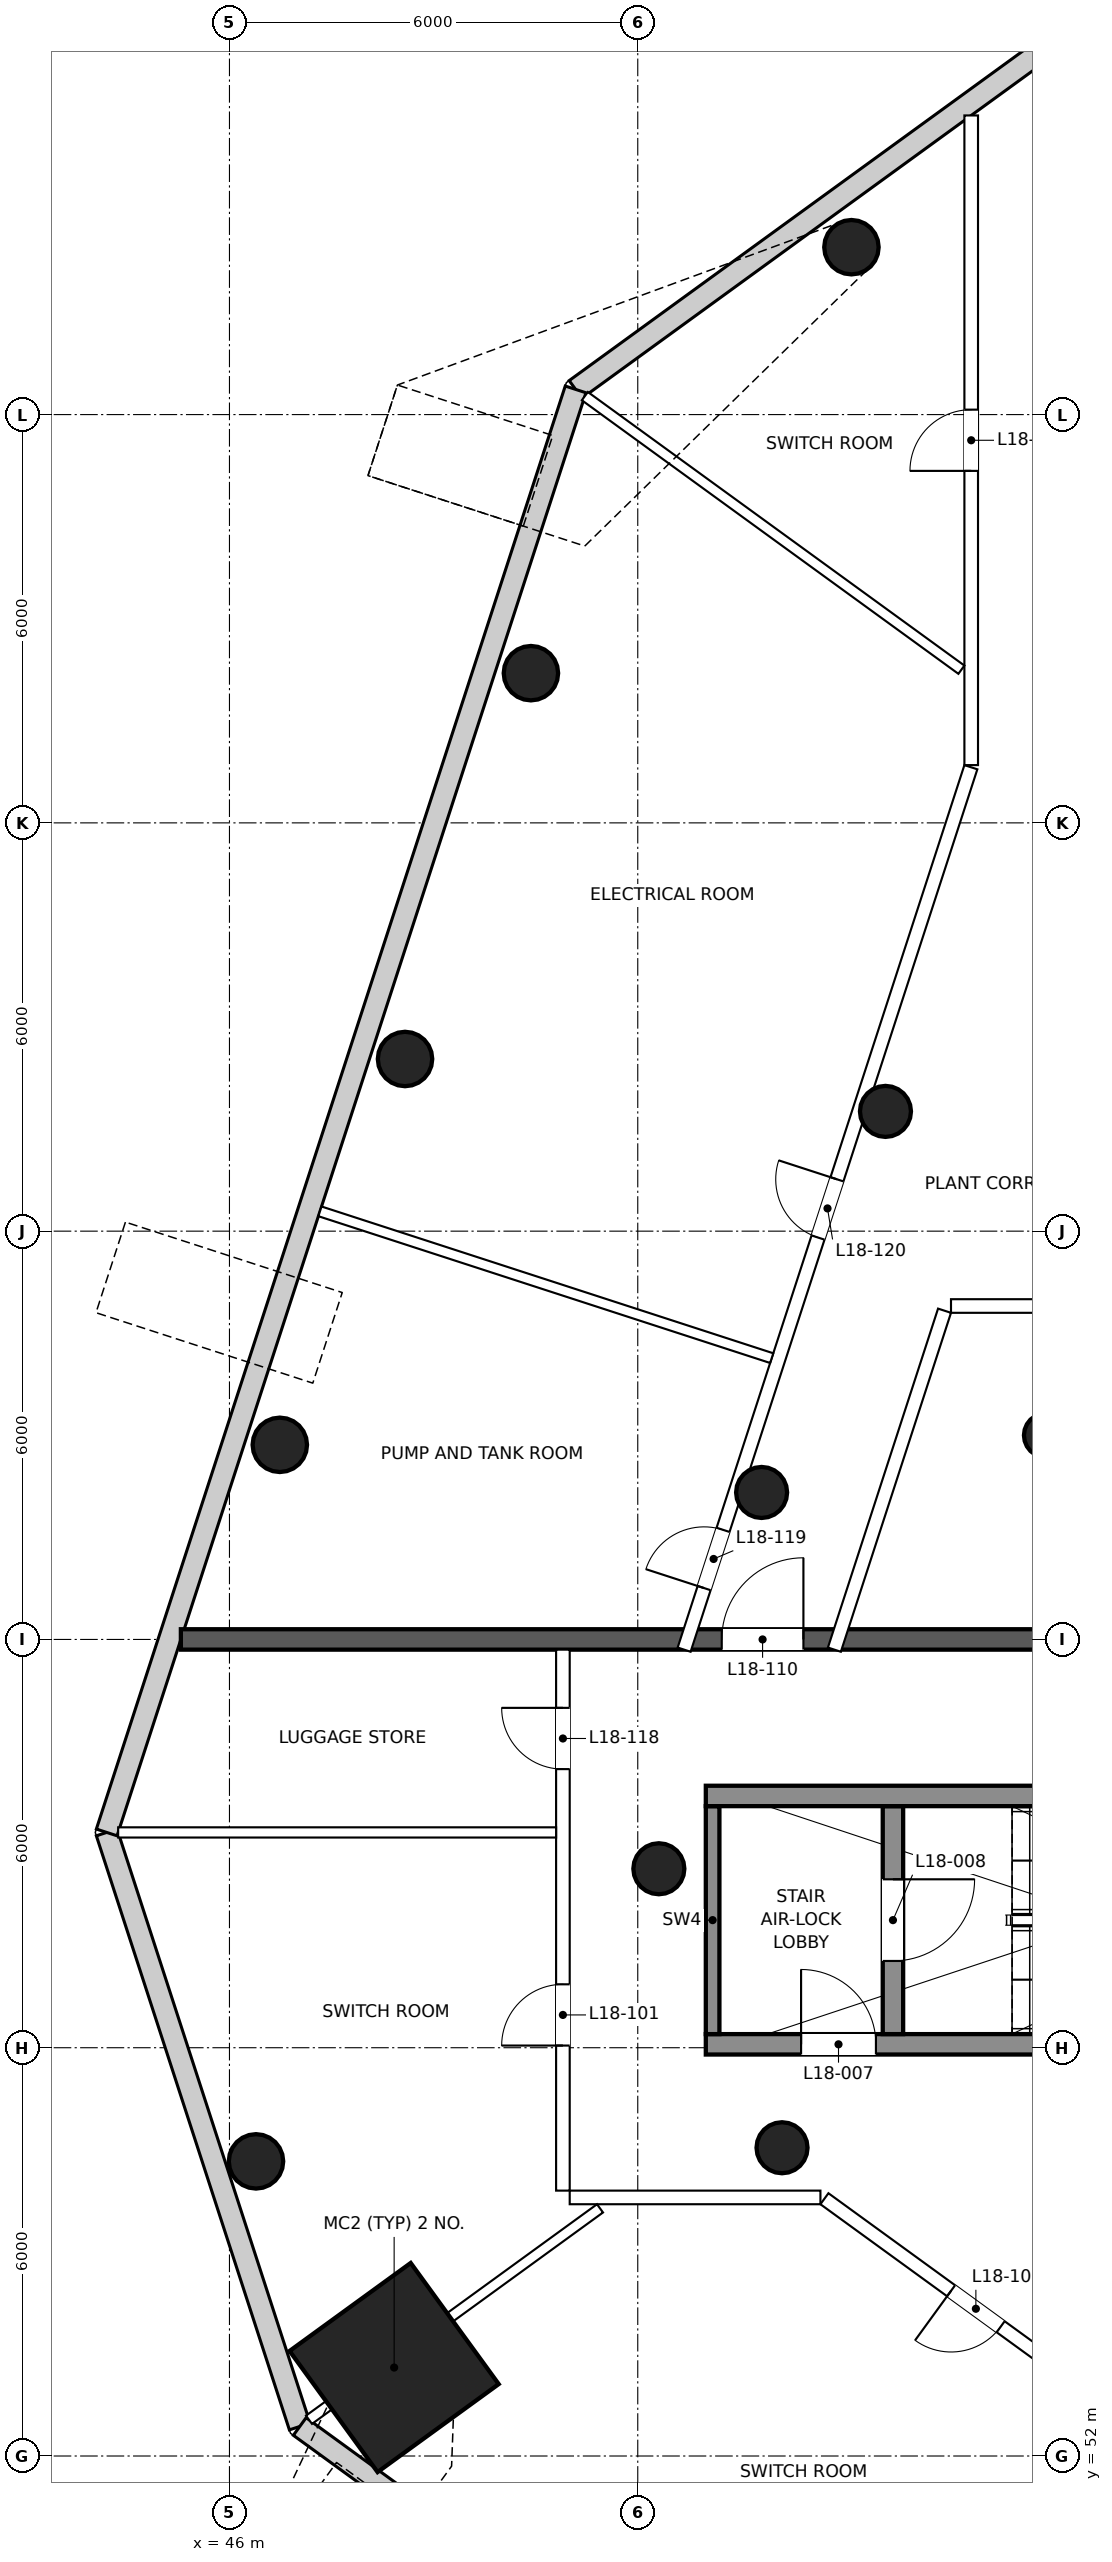
"""IFC4 building model, lengths in metres.
Left out: names, types, materials, properties, quantities, classifications, styles, units other than length and angle.
Written with IfcOpenShell. Run it as: python <this file> out.ifc"""

import sys

from ifc_helpers import new_model, si_unit, direction, frame, frame_2d, origin, origin_2d, place, context, subcontext, project, spatial, rectangle, circle, extrude, element, fill, save


model = new_model("IFC4")
c1 = context("Model", 3, precision=1e-05, world=origin(), true_north=direction((0.0, 1.0)))
c2 = subcontext(c1, "Body", "Model", "MODEL_VIEW")
j1 = project(units=[si_unit("LENGTHUNIT", "METRE"), si_unit("PLANEANGLEUNIT", "RADIAN")], contexts=[c1])
p1 = place(None, origin())
s1 = spatial("IfcSite", under=j1, at=p1, CompositionType="ELEMENT")
p2 = place(p1, origin())
s2 = spatial("IfcBuilding", under=s1, at=p2, CompositionType="ELEMENT")
p3 = place(p2, frame((0.0, 0.0, 85.8)))
s3 = spatial("IfcBuildingStorey", under=s2, at=p3, CompositionType="ELEMENT", Elevation=85.8)
p4 = place(p3, frame((46.39, 56.33, 0.0), z_axis=(0.0, 0.0, 1.0), x_axis=(1.0, 0.0, 0.0)))
e1 = element("IfcColumn", 1, at=p4, inside=s3, PredefinedType="COLUMN", context=c2, shape_type="SweptSolid", body=[
    extrude(circle(Radius=0.4, at=origin_2d()), origin(), (0.0, 0.0, 1.0), 5.0),
])
p5 = place(p3, frame((48.42, 53.3, 0.0), z_axis=(0.0, 0.0, 1.0), x_axis=(-0.809016994375, -0.587785252292, 0.0)))
e2 = element("IfcColumn", 2, at=p5, inside=s3, PredefinedType="COLUMN", context=c2, shape_type="SweptSolid", body=[
    extrude(rectangle(XDim=2.2, YDim=2.2, at=origin_2d()), origin(), (0.0, 0.0, 1.0), 5.0),
])
for number, where, z_axis, x_axis in (
    (3, (55.14, 84.46, 0.0), (0.0, 0.0, 1.0), (1.0, 0.0, 0.0)),
    (4, (50.43, 78.2, 0.0), (0.0, 0.0, 1.0), (1.0, 0.0, 0.0)),
    (5, (48.58, 72.53, 0.0), (0.0, 0.0, 1.0), (1.0, 0.0, 0.0)),
    (6, (46.74, 66.86, 0.0), (0.0, 0.0, 1.0), (1.0, 0.0, 0.0)),
):
    element("IfcColumn", number, at=place(p3, frame(where, z_axis=z_axis, x_axis=x_axis)), inside=s3, PredefinedType="COLUMN", context=c2, shape_type="SweptSolid", body=[
        extrude(circle(Radius=0.4, at=origin_2d()), origin(), (0.0, 0.0, 1.0), 5.0),
    ])
for number, where, z_axis, x_axis in (
    (7, (52.31, 60.63, 0.0), (0.0, 0.0, 1.0), (1.0, 0.0, 0.0)),
    (8, (54.12, 56.53, 0.0), (0.0, 0.0, 1.0), (1.0, 0.0, 0.0)),
    (9, (55.64, 71.76, 0.0), (0.0, 0.0, 1.0), (1.0, 0.0, 0.0)),
    (10, (53.82, 66.16, 0.0), (0.0, 0.0, 1.0), (1.0, 0.0, 0.0)),
):
    element("IfcColumn", number, at=place(p3, frame(where, z_axis=z_axis, x_axis=x_axis)), inside=s3, PredefinedType="COLUMN", context=c2, shape_type="SweptSolid", body=[
        extrude(circle(Radius=0.375, at=origin_2d()), origin(), (0.0, 0.0, 1.0), 5.0),
    ])
p6 = place(p3, frame((58.0, 67.0, 0.0), z_axis=(0.0, 0.0, 1.0), x_axis=(1.0, 0.0, 0.0)))
e11 = element("IfcColumn", 11, at=p6, inside=s3, PredefinedType="COLUMN", context=c2, shape_type="SweptSolid", body=[
    extrude(circle(Radius=0.325, at=origin_2d()), origin(), (0.0, 0.0, 1.0), 5.0),
])
p7 = place(p3, frame((44.196, 61.164, 0.0), z_axis=(0.0, 0.0, 1.0), x_axis=(0.309021723461, -0.951054979709, 0.0)))
e12 = element("IfcWall", 12, at=p7, inside=s3, PredefinedType="SOLIDWALL", context=c2, shape_type="SweptSolid", body=[
    extrude(rectangle(XDim=9.179, YDim=0.32, at=frame_2d((4.59, 0.0))), origin(), (0.0, 0.0, 1.0), 4.7),
])
p8 = place(p3, frame((47.033, 52.434, 0.0), z_axis=(0.0, 0.0, 1.0), x_axis=(0.809018497564, -0.587783183325, 0.0)))
e13 = element("IfcWall", 13, at=p8, inside=s3, PredefinedType="SOLIDWALL", context=c2, shape_type="SweptSolid", body=[
    extrude(rectangle(XDim=22.609, YDim=0.32, at=frame_2d((11.305, 0.0))), origin(), (0.0, 0.0, 1.0), 4.7),
])
p9 = place(p3, frame((58.615, 87.84, 0.0), z_axis=(0.0, 0.0, 1.0), x_axis=(-0.809021884019, -0.587778522216, 0.0)))
e14 = element("IfcWall", 14, at=p9, inside=s3, PredefinedType="SOLIDWALL", context=c2, shape_type="SweptSolid", body=[
    extrude(rectangle(XDim=9.306, YDim=0.32, at=frame_2d((4.653, 0.0))), origin(), (0.0, 0.0, 1.0), 4.7),
])
p10 = place(p3, frame((51.086, 82.37, 0.0), z_axis=(0.0, 0.0, 1.0), x_axis=(-0.309015264684, -0.951057078304, 0.0)))
e15 = element("IfcWall", 15, at=p10, inside=s3, PredefinedType="SOLIDWALL", context=c2, shape_type="SweptSolid", body=[
    extrude(rectangle(XDim=22.298, YDim=0.32, at=frame_2d((11.149, 0.0))), origin(), (0.0, 0.0, 1.0), 4.7),
])
p11 = place(p3, frame((53.0, 58.05, 0.0), z_axis=(0.0, 0.0, 1.0), x_axis=(1.0, 0.0, 0.0)))
e16 = element("IfcWall", 16, at=p11, inside=s3, PredefinedType="SHEAR", context=c2, shape_type="SweptSolid", body=[
    extrude(rectangle(XDim=11.9, YDim=0.3, at=frame_2d((5.95, 0.0))), origin(), (0.0, 0.0, 1.0), 5.0),
])
p12 = place(p11, frame((1.4, 0.0, 0.0)))
e17 = element("IfcOpeningElement", 17, at=p12, cuts=e16, PredefinedType="OPENING", context=c2, shape_type="SweptSolid", body=[
    extrude(rectangle(XDim=1.1, YDim=2.1, at=frame_2d((0.55, 1.05))), frame((0.0, 0.16, 0.0), z_axis=(0.0, -1.0, 0.0), x_axis=(1.0, 0.0, 0.0)), (0.0, 0.0, 1.0), 0.32),
])
p13 = place(p3, frame((53.1, 58.2, 0.0), z_axis=(0.0, 0.0, 1.0), x_axis=(0.0, 1.0, 0.0)))
e18 = element("IfcWall", 18, at=p13, inside=s3, PredefinedType="SHEAR", context=c2, shape_type="SweptSolid", body=[
    extrude(rectangle(XDim=3.35, YDim=0.2, at=frame_2d((1.675, 0.0))), origin(), (0.0, 0.0, 1.0), 5.0),
])
p14 = place(p3, frame((55.75, 58.2, 0.0), z_axis=(0.0, 0.0, 1.0), x_axis=(0.0, 1.0, 0.0)))
e19 = element("IfcWall", 19, at=p14, inside=s3, PredefinedType="SHEAR", context=c2, shape_type="SweptSolid", body=[
    extrude(rectangle(XDim=3.35, YDim=0.3, at=frame_2d((1.675, 0.0))), origin(), (0.0, 0.0, 1.0), 5.0),
])
p15 = place(p14, frame((1.075, 0.0, 0.0)))
e20 = element("IfcOpeningElement", 20, at=p15, cuts=e19, PredefinedType="OPENING", context=c2, shape_type="SweptSolid", body=[
    extrude(rectangle(XDim=1.2, YDim=2.1, at=frame_2d((0.6, 1.05))), frame((0.0, 0.16, 0.0), z_axis=(0.0, -1.0, 0.0), x_axis=(1.0, 0.0, 0.0)), (0.0, 0.0, 1.0), 0.32),
])
p16 = place(p3, frame((53.0, 61.7, 0.0), z_axis=(0.0, 0.0, 1.0), x_axis=(1.0, 0.0, 0.0)))
e21 = element("IfcWall", 21, at=p16, inside=s3, PredefinedType="SHEAR", context=c2, shape_type="SweptSolid", body=[
    extrude(rectangle(XDim=11.9, YDim=0.3, at=frame_2d((5.95, 0.0))), origin(), (0.0, 0.0, 1.0), 5.0),
])
p17 = place(p3, frame((45.286, 64.0, 0.0), z_axis=(0.0, 0.0, 1.0), x_axis=(1.0, 0.0, 0.0)))
e22 = element("IfcWall", 22, at=p17, inside=s3, PredefinedType="PARTITIONING", context=c2, shape_type="SweptSolid", body=[
    extrude(rectangle(XDim=49.428, YDim=0.3, at=frame_2d((24.714, 0.0))), origin(), (0.0, 0.0, 1.0), 3.7),
])
p18 = place(p17, frame((7.948, 0.0, 0.0)))
e23 = element("IfcOpeningElement", 23, at=p18, cuts=e22, PredefinedType="OPENING", context=c2, shape_type="SweptSolid", body=[
    extrude(rectangle(XDim=1.2, YDim=2.1, at=frame_2d((0.6, 1.05))), frame((0.0, 0.16, 0.0), z_axis=(0.0, -1.0, 0.0), x_axis=(1.0, 0.0, 0.0)), (0.0, 0.0, 1.0), 0.32),
])
p19 = place(p17, frame((24.114, 0.0, 0.0)))
e24 = element("IfcOpeningElement", 24, at=p19, cuts=e22, PredefinedType="OPENING", context=c2, shape_type="SweptSolid", body=[
    extrude(rectangle(XDim=1.2, YDim=2.1, at=frame_2d((0.6, 1.05))), frame((0.0, 0.16, 0.0), z_axis=(0.0, -1.0, 0.0), x_axis=(1.0, 0.0, 0.0)), (0.0, 0.0, 1.0), 0.32),
])
p20 = place(p17, frame((40.28, 0.0, 0.0)))
e25 = element("IfcOpeningElement", 25, at=p20, cuts=e22, PredefinedType="OPENING", context=c2, shape_type="SweptSolid", body=[
    extrude(rectangle(XDim=1.2, YDim=2.1, at=frame_2d((0.6, 1.05))), frame((0.0, 0.16, 0.0), z_axis=(0.0, -1.0, 0.0), x_axis=(1.0, 0.0, 0.0)), (0.0, 0.0, 1.0), 0.32),
])
p21 = place(p3, frame((52.681, 63.85, 0.0), z_axis=(0.0, 0.0, 1.0), x_axis=(0.309020889227, 0.951055250772, 0.0)))
e26 = element("IfcWall", 26, at=p21, inside=s3, PredefinedType="PARTITIONING", context=c2, shape_type="SweptSolid", body=[
    extrude(rectangle(XDim=13.635, YDim=0.2, at=frame_2d((6.818, 0.0))), origin(), (0.0, 0.0, 1.0), 4.7),
])
p22 = place(p21, frame((0.951, 0.0, 0.0)))
e27 = element("IfcOpeningElement", 27, at=p22, cuts=e26, PredefinedType="OPENING", context=c2, shape_type="SweptSolid", body=[
    extrude(rectangle(XDim=0.9, YDim=2.1, at=frame_2d((0.45, 1.05))), frame((0.0, 0.11, 0.0), z_axis=(0.0, -1.0, 0.0), x_axis=(1.0, 0.0, 0.0)), (0.0, 0.0, 1.0), 0.22),
])
p23 = place(p21, frame((6.368, 0.0, 0.0)))
e28 = element("IfcOpeningElement", 28, at=p23, cuts=e26, PredefinedType="OPENING", context=c2, shape_type="SweptSolid", body=[
    extrude(rectangle(XDim=0.9, YDim=2.1, at=frame_2d((0.45, 1.05))), frame((0.0, 0.11, 0.0), z_axis=(0.0, -1.0, 0.0), x_axis=(1.0, 0.0, 0.0)), (0.0, 0.0, 1.0), 0.22),
])
p24 = place(p3, frame((56.9, 76.849, 0.0), z_axis=(0.0, 0.0, 1.0), x_axis=(0.0, 1.0, 0.0)))
e29 = element("IfcWall", 29, at=p24, inside=s3, PredefinedType="PARTITIONING", context=c2, shape_type="SweptSolid", body=[
    extrude(rectangle(XDim=9.547, YDim=0.2, at=frame_2d((4.773, 0.0))), origin(), (0.0, 0.0, 1.0), 4.2),
])
p25 = place(p24, frame((4.323, 0.0, 0.0)))
e30 = element("IfcOpeningElement", 30, at=p25, cuts=e29, PredefinedType="OPENING", context=c2, shape_type="SweptSolid", body=[
    extrude(rectangle(XDim=0.9, YDim=2.1, at=frame_2d((0.45, 1.05))), frame((0.0, 0.11, 0.0), z_axis=(0.0, -1.0, 0.0), x_axis=(1.0, 0.0, 0.0)), (0.0, 0.0, 1.0), 0.22),
])
p26 = place(p3, frame((67.65, 46.403, 0.0), z_axis=(0.0, 0.0, 1.0), x_axis=(-0.809010618519, 0.587794027805, 0.0)))
e31 = element("IfcWall", 31, at=p26, inside=s3, PredefinedType="PARTITIONING", context=c2, shape_type="SweptSolid", body=[
    extrude(rectangle(XDim=15.954, YDim=0.2, at=frame_2d((7.977, 0.0))), origin(), (0.0, 0.0, 1.0), 3.7),
])
p27 = place(p26, frame((12.753, 0.0, 0.0)))
e32 = element("IfcOpeningElement", 32, at=p27, cuts=e31, PredefinedType="OPENING", context=c2, shape_type="SweptSolid", body=[
    extrude(rectangle(XDim=0.9, YDim=2.1, at=frame_2d((0.45, 1.05))), frame((0.0, 0.11, 0.0), z_axis=(0.0, -1.0, 0.0), x_axis=(1.0, 0.0, 0.0)), (0.0, 0.0, 1.0), 0.22),
])
p28 = place(p26, frame((6.969, 0.0, 0.0)))
e33 = element("IfcOpeningElement", 33, at=p28, cuts=e31, PredefinedType="OPENING", context=c2, shape_type="SweptSolid", body=[
    extrude(rectangle(XDim=0.9, YDim=2.1, at=frame_2d((0.45, 1.05))), frame((0.0, 0.11, 0.0), z_axis=(0.0, -1.0, 0.0), x_axis=(1.0, 0.0, 0.0)), (0.0, 0.0, 1.0), 0.22),
])
p29 = place(p26, frame((1.743, 0.0, 0.0)))
e34 = element("IfcOpeningElement", 34, at=p29, cuts=e31, PredefinedType="OPENING", context=c2, shape_type="SweptSolid", body=[
    extrude(rectangle(XDim=0.9, YDim=2.1, at=frame_2d((0.45, 1.05))), frame((0.0, 0.11, 0.0), z_axis=(0.0, -1.0, 0.0), x_axis=(1.0, 0.0, 0.0)), (0.0, 0.0, 1.0), 0.22),
])
p30 = place(p3, frame((54.684, 55.8, 0.0), z_axis=(0.0, 0.0, 1.0), x_axis=(-1.0, 0.0, 0.0)))
e35 = element("IfcWall", 35, at=p30, inside=s3, PredefinedType="PARTITIONING", context=c2, shape_type="SweptSolid", body=[
    extrude(rectangle(XDim=3.684, YDim=0.2, at=frame_2d((1.842, 0.0))), origin(), (0.0, 0.0, 1.0), 4.7),
])
p31 = place(p3, frame((50.9, 55.9, 0.0), z_axis=(0.0, 0.0, 1.0), x_axis=(0.0, 1.0, 0.0)))
e36 = element("IfcWall", 36, at=p31, inside=s3, PredefinedType="PARTITIONING", context=c2, shape_type="SweptSolid", body=[
    extrude(rectangle(XDim=7.95, YDim=0.2, at=frame_2d((3.975, 0.0))), origin(), (0.0, 0.0, 1.0), 4.7),
])
p32 = place(p31, frame((2.132, 0.0, 0.0)))
e37 = element("IfcOpeningElement", 37, at=p32, cuts=e36, PredefinedType="OPENING", context=c2, shape_type="SweptSolid", body=[
    extrude(rectangle(XDim=0.9, YDim=2.1, at=frame_2d((0.45, 1.05))), frame((0.0, 0.11, 0.0), z_axis=(0.0, -1.0, 0.0), x_axis=(1.0, 0.0, 0.0)), (0.0, 0.0, 1.0), 0.22),
])
p33 = place(p31, frame((6.194, 0.0, 0.0)))
e38 = element("IfcOpeningElement", 38, at=p33, cuts=e36, PredefinedType="OPENING", context=c2, shape_type="SweptSolid", body=[
    extrude(rectangle(XDim=0.9, YDim=2.1, at=frame_2d((0.45, 1.05))), frame((0.0, 0.11, 0.0), z_axis=(0.0, -1.0, 0.0), x_axis=(1.0, 0.0, 0.0)), (0.0, 0.0, 1.0), 0.22),
])
p34 = place(p3, frame((68.85, 68.9, 0.0), z_axis=(0.0, 0.0, 1.0), x_axis=(-1.0, 0.0, 0.0)))
e39 = element("IfcWall", 39, at=p34, inside=s3, PredefinedType="PARTITIONING", context=c2, shape_type="SweptSolid", body=[
    extrude(rectangle(XDim=12.247, YDim=0.2, at=frame_2d((6.124, 0.0))), origin(), (0.0, 0.0, 1.0), 4.7),
])
p35 = place(p34, frame((8.712, 0.0, 0.0)))
e40 = element("IfcOpeningElement", 40, at=p35, cuts=e39, PredefinedType="OPENING", context=c2, shape_type="SweptSolid", body=[
    extrude(rectangle(XDim=0.9, YDim=2.1, at=frame_2d((0.45, 1.05))), frame((0.0, 0.11, 0.0), z_axis=(0.0, -1.0, 0.0), x_axis=(1.0, 0.0, 0.0)), (0.0, 0.0, 1.0), 0.22),
])
p36 = place(p3, frame((56.508, 68.831, 0.0), z_axis=(0.0, 0.0, 1.0), x_axis=(-0.309030204086, -0.951052224099, 0.0)))
e41 = element("IfcWall", 41, at=p36, inside=s3, PredefinedType="PARTITIONING", context=c2, shape_type="SweptSolid", body=[
    extrude(rectangle(XDim=5.237, YDim=0.2, at=frame_2d((2.619, 0.0))), origin(), (0.0, 0.0, 1.0), 4.7),
])
p37 = place(p3, frame((51.223, 82.271, 0.0), z_axis=(0.0, 0.0, 1.0), x_axis=(0.809006128226, -0.587800207973, 0.0)))
e42 = element("IfcWall", 42, at=p37, inside=s3, PredefinedType="PARTITIONING", context=c2, shape_type="SweptSolid", body=[
    extrude(rectangle(XDim=6.84, YDim=0.15, at=frame_2d((3.42, 0.0))), origin(), (0.0, 0.0, 1.0), 4.2),
])
p38 = place(p3, frame((44.365, 61.164, 0.0), z_axis=(0.0, 0.0, 1.0), x_axis=(1.0, 0.0, 0.0)))
e43 = element("IfcWall", 43, at=p38, inside=s3, PredefinedType="PARTITIONING", context=c2, shape_type="SweptSolid", body=[
    extrude(rectangle(XDim=6.436, YDim=0.15, at=frame_2d((3.218, 0.0))), origin(), (0.0, 0.0, 1.0), 4.0),
])
p39 = place(p3, frame((47.169, 52.532, 0.0), z_axis=(0.0, 0.0, 1.0), x_axis=(0.809003648196, 0.587803621293, 0.0)))
e44 = element("IfcWall", 44, at=p39, inside=s3, PredefinedType="PARTITIONING", context=c2, shape_type="SweptSolid", body=[
    extrude(rectangle(XDim=5.286, YDim=0.15, at=frame_2d((2.643, 0.0))), origin(), (0.0, 0.0, 1.0), 3.7),
])
p40 = place(p3, frame((47.33, 70.291, 0.0), z_axis=(0.0, 0.0, 1.0), x_axis=(0.951055400562, -0.309020428229, 0.0)))
e45 = element("IfcWall", 45, at=p40, inside=s3, PredefinedType="PARTITIONING", context=c2, shape_type="SweptSolid", body=[
    extrude(rectangle(XDim=6.98, YDim=0.15, at=frame_2d((3.49, 0.0))), origin(), (0.0, 0.0, 1.0), 4.2),
])
p41 = place(p3, frame((55.059, 46.8, 0.0), z_axis=(0.0, 0.0, 1.0), x_axis=(0.587786885163, 0.809015808023, 0.0)))
e46 = element("IfcWall", 46, at=p41, inside=s3, PredefinedType="PARTITIONING", context=c2, shape_type="SweptSolid", body=[
    extrude(rectangle(XDim=6.98, YDim=0.15, at=frame_2d((3.49, 0.0))), origin(), (0.0, 0.0, 1.0), 3.7),
])
p42 = place(p12, origin())
e47 = element("IfcDoor", 47, at=p42, inside=s3, OperationType="SINGLE_SWING_LEFT", PredefinedType="DOOR", context=c2, shape_type="SweptSolid", body=[
    extrude(rectangle(XDim=1.1, YDim=2.1, at=frame_2d((0.55, 1.05))), frame((0.0, 0.025, 0.0), z_axis=(0.0, -1.0, 0.0), x_axis=(1.0, 0.0, 0.0)), (0.0, 0.0, 1.0), 0.05),
])
fill(e17, e47)
p43 = place(p15, frame((1.2, 0.0, 0.0), z_axis=(0.0, 0.0, 1.0), x_axis=(-1.0, 0.0, 0.0)))
e48 = element("IfcDoor", 48, at=p43, inside=s3, OperationType="SINGLE_SWING_LEFT", PredefinedType="DOOR", context=c2, shape_type="SweptSolid", body=[
    extrude(rectangle(XDim=1.2, YDim=2.1, at=frame_2d((0.6, 1.05))), frame((0.0, 0.025, 0.0), z_axis=(0.0, -1.0, 0.0), x_axis=(1.0, 0.0, 0.0)), (0.0, 0.0, 1.0), 0.05),
])
fill(e20, e48)
p44 = place(p32, origin())
e49 = element("IfcDoor", 49, at=p44, inside=s3, OperationType="SINGLE_SWING_LEFT", PredefinedType="DOOR", context=c2, shape_type="SweptSolid", body=[
    extrude(rectangle(XDim=0.9, YDim=2.1, at=frame_2d((0.45, 1.05))), frame((0.0, 0.025, 0.0), z_axis=(0.0, -1.0, 0.0), x_axis=(1.0, 0.0, 0.0)), (0.0, 0.0, 1.0), 0.05),
])
fill(e37, e49)
p45 = place(p27, origin())
e50 = element("IfcDoor", 50, at=p45, inside=s3, OperationType="SINGLE_SWING_RIGHT", PredefinedType="DOOR", context=c2, shape_type="SweptSolid", body=[
    extrude(rectangle(XDim=0.9, YDim=2.1, at=frame_2d((0.45, 1.05))), frame((0.0, 0.025, 0.0), z_axis=(0.0, -1.0, 0.0), x_axis=(1.0, 0.0, 0.0)), (0.0, 0.0, 1.0), 0.05),
])
fill(e32, e50)
p46 = place(p18, origin())
e51 = element("IfcDoor", 51, at=p46, inside=s3, OperationType="SINGLE_SWING_RIGHT", PredefinedType="DOOR", context=c2, shape_type="SweptSolid", body=[
    extrude(rectangle(XDim=1.2, YDim=2.1, at=frame_2d((0.6, 1.05))), frame((0.0, 0.025, 0.0), z_axis=(0.0, -1.0, 0.0), x_axis=(1.0, 0.0, 0.0)), (0.0, 0.0, 1.0), 0.05),
])
fill(e23, e51)
p47 = place(p33, origin())
e52 = element("IfcDoor", 52, at=p47, inside=s3, OperationType="SINGLE_SWING_RIGHT", PredefinedType="DOOR", context=c2, shape_type="SweptSolid", body=[
    extrude(rectangle(XDim=0.9, YDim=2.1, at=frame_2d((0.45, 1.05))), frame((0.0, 0.025, 0.0), z_axis=(0.0, -1.0, 0.0), x_axis=(1.0, 0.0, 0.0)), (0.0, 0.0, 1.0), 0.05),
])
fill(e38, e52)
p48 = place(p22, origin())
e53 = element("IfcDoor", 53, at=p48, inside=s3, OperationType="SINGLE_SWING_LEFT", PredefinedType="DOOR", context=c2, shape_type="SweptSolid", body=[
    extrude(rectangle(XDim=0.9, YDim=2.1, at=frame_2d((0.45, 1.05))), frame((0.0, 0.025, 0.0), z_axis=(0.0, -1.0, 0.0), x_axis=(1.0, 0.0, 0.0)), (0.0, 0.0, 1.0), 0.05),
])
fill(e27, e53)
p49 = place(p23, origin())
e54 = element("IfcDoor", 54, at=p49, inside=s3, OperationType="SINGLE_SWING_RIGHT", PredefinedType="DOOR", context=c2, shape_type="SweptSolid", body=[
    extrude(rectangle(XDim=0.9, YDim=2.1, at=frame_2d((0.45, 1.05))), frame((0.0, 0.025, 0.0), z_axis=(0.0, -1.0, 0.0), x_axis=(1.0, 0.0, 0.0)), (0.0, 0.0, 1.0), 0.05),
])
fill(e28, e54)
p50 = place(p25, origin())
e55 = element("IfcDoor", 55, at=p50, inside=s3, OperationType="SINGLE_SWING_LEFT", PredefinedType="DOOR", context=c2, shape_type="SweptSolid", body=[
    extrude(rectangle(XDim=0.9, YDim=2.1, at=frame_2d((0.45, 1.05))), frame((0.0, 0.025, 0.0), z_axis=(0.0, -1.0, 0.0), x_axis=(1.0, 0.0, 0.0)), (0.0, 0.0, 1.0), 0.05),
])
fill(e30, e55)
save(model, sys.argv[1])
